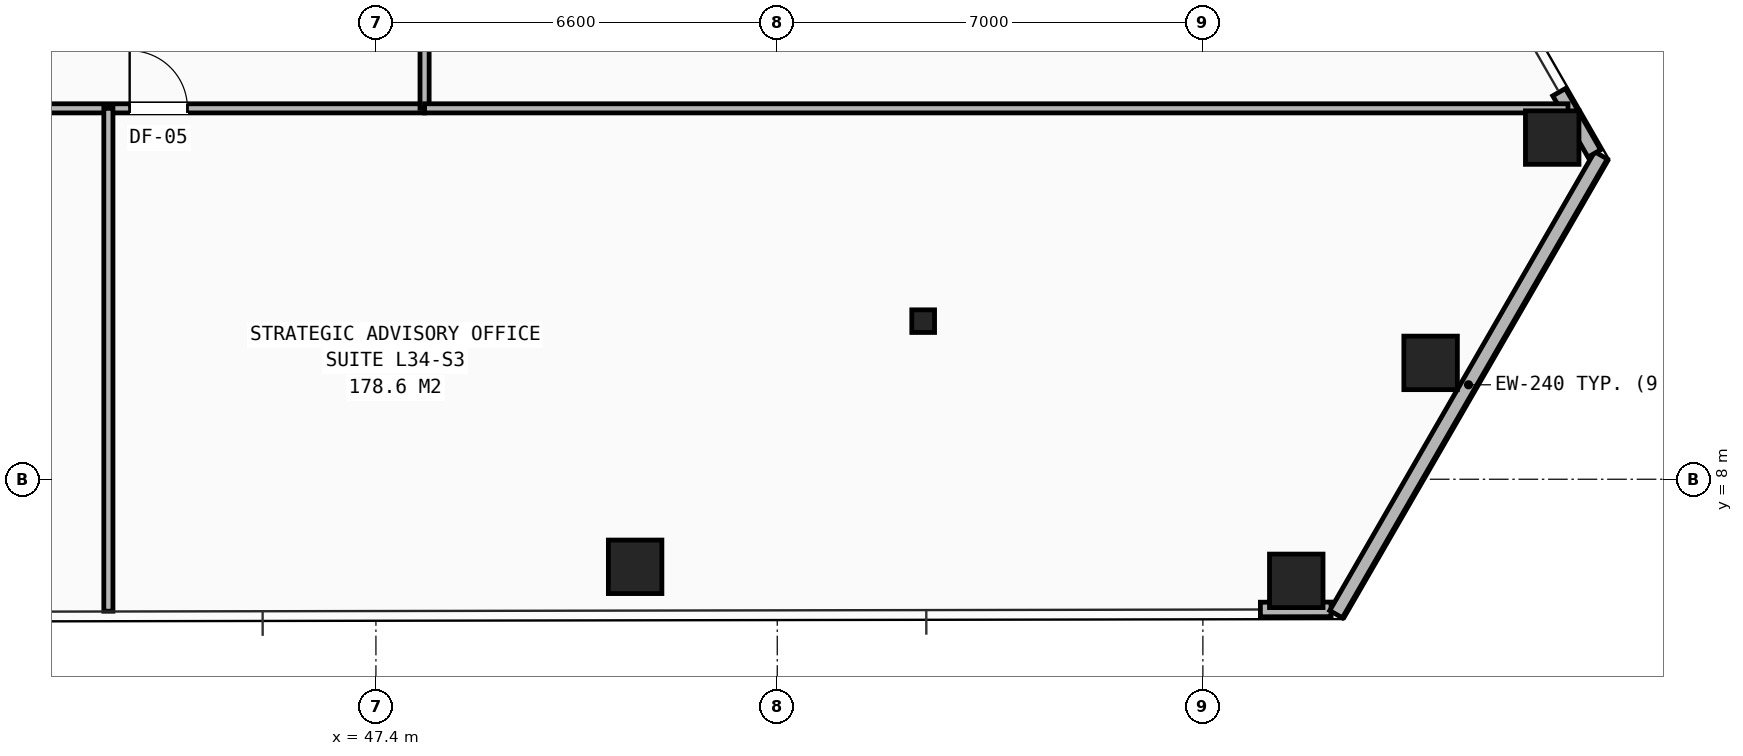
"""IFC4 building model, lengths in metres.
Left out: names, types, materials, properties, quantities, classifications, styles, units other than length and angle.
Written with IfcOpenShell. Run it as: python <this file> out.ifc"""

import sys

from ifc_helpers import new_model, si_unit, direction, frame, frame_2d, origin, origin_2d, place, context, subcontext, project, spatial, rectangle, hollow_rectangle, i_section, extrude, element, fill, save


model = new_model("IFC4")
c1 = context("Model", 3, precision=1e-05, world=origin(), true_north=direction((0.0, 1.0)))
c2 = subcontext(c1, "Body", "Model", "MODEL_VIEW")
j1 = project(units=[si_unit("LENGTHUNIT", "METRE"), si_unit("PLANEANGLEUNIT", "RADIAN")], contexts=[c1])
p1 = place(None, origin())
s1 = spatial("IfcSite", under=j1, at=p1, CompositionType="ELEMENT")
p2 = place(p1, origin())
s2 = spatial("IfcBuilding", under=s1, at=p2, CompositionType="ELEMENT")
p3 = place(p2, frame((0.0, 0.0, 119.45)))
s3 = spatial("IfcBuildingStorey", under=s2, at=p3, CompositionType="ELEMENT", Elevation=119.45)
p4 = place(p3, frame((56.4, 10.6, 0.0), z_axis=(0.0, 0.0, 1.0), x_axis=(1.0, 0.0, 0.0)))
e1 = element("IfcColumn", 1, at=p4, inside=s3, PredefinedType="COLUMN", context=c2, shape_type="SweptSolid", body=[
    extrude(i_section(OverallWidth=0.374, OverallDepth=0.372, WebThickness=0.016, FlangeThickness=0.026, at=origin_2d()), origin(), (0.0, 0.0, 1.0), 3.45),
])
for number, where, z_axis, x_axis in (
    (2, (51.663, 6.56, 0.0), (0.0, 0.0, 1.0), (1.0, 0.0, 0.0)),
    (3, (62.536, 6.329, 0.0), (0.0, 0.0, 1.0), (1.0, 0.0, 0.0)),
    (4, (64.745, 9.913, 0.0), (0.0, 0.0, 1.0), (1.0, 0.0, 0.0)),
    (5, (66.745, 13.619, 0.0), (0.0, 0.0, 1.0), (1.0, 0.0, 0.0)),
):
    element("IfcColumn", number, at=place(p3, frame(where, z_axis=z_axis, x_axis=x_axis)), inside=s3, PredefinedType="COLUMN", context=c2, shape_type="SweptSolid", body=[
        extrude(hollow_rectangle(XDim=0.88, YDim=0.88, WallThickness=0.06, at=origin_2d()), origin(), (0.0, 0.0, 1.0), 3.45),
    ])
p5 = place(p3, frame((61.946, 5.858, 0.0), z_axis=(0.0, 0.0, 1.0), x_axis=(0.999998588859, 0.00167996403, 0.0)))
e6 = element("IfcWall", 6, at=p5, inside=s3, PredefinedType="SHEAR", context=c2, shape_type="SweptSolid", body=[
    extrude(rectangle(XDim=1.163, YDim=0.24, at=frame_2d((0.581, 0.0))), origin(), (0.0, 0.0, 1.0), 2.583),
])
p6 = place(p3, frame((67.547, 13.327, 0.0), z_axis=(0.0, 0.0, 1.0), x_axis=(-0.499998917442, -0.866026028799, 0.0)))
e7 = element("IfcWall", 7, at=p6, inside=s3, PredefinedType="SHEAR", context=c2, shape_type="SweptSolid", body=[
    extrude(rectangle(XDim=8.714, YDim=0.24, at=frame_2d((4.357, 0.0))), origin(), (0.0, 0.0, 1.0), 2.583),
])
p7 = place(p3, frame((67.438, 13.358, 0.0), z_axis=(0.0, 0.0, 1.0), x_axis=(-0.498625017703, 0.866817796149, 0.0)))
e8 = element("IfcWall", 8, at=p7, inside=s3, PredefinedType="SHEAR", context=c2, shape_type="SweptSolid", body=[
    extrude(rectangle(XDim=1.162, YDim=0.24, at=frame_2d((0.581, 0.0))), origin(), (0.0, 0.0, 1.0), 2.583),
])
p8 = place(p3, frame((29.6, 14.1, 0.0), z_axis=(0.0, 0.0, 1.0), x_axis=(1.0, 0.0, 0.0)))
e9 = element("IfcWall", 9, at=p8, inside=s3, PredefinedType="PARTITIONING", context=c2, shape_type="SweptSolid", body=[
    extrude(rectangle(XDim=18.6, YDim=0.15, at=frame_2d((9.3, 0.0))), origin(), (0.0, 0.0, 1.0), 2.252),
])
p9 = place(p8, frame((0.55, 0.0, 0.0)))
e10 = element("IfcOpeningElement", 10, at=p9, cuts=e9, PredefinedType="OPENING", context=c2, shape_type="SweptSolid", body=[
    extrude(rectangle(XDim=0.95, YDim=2.1, at=frame_2d((0.475, 1.05))), frame((0.0, 0.085, 0.0), z_axis=(0.0, -1.0, 0.0), x_axis=(1.0, 0.0, 0.0)), (0.0, 0.0, 1.0), 0.17),
])
p10 = place(p8, frame((7.25, 0.0, 0.0)))
e11 = element("IfcOpeningElement", 11, at=p10, cuts=e9, PredefinedType="OPENING", context=c2, shape_type="SweptSolid", body=[
    extrude(rectangle(XDim=0.95, YDim=2.1, at=frame_2d((0.475, 1.05))), frame((0.0, 0.085, 0.0), z_axis=(0.0, -1.0, 0.0), x_axis=(1.0, 0.0, 0.0)), (0.0, 0.0, 1.0), 0.17),
])
p11 = place(p8, frame((13.75, 0.0, 0.0)))
e12 = element("IfcOpeningElement", 12, at=p11, cuts=e9, PredefinedType="OPENING", context=c2, shape_type="SweptSolid", body=[
    extrude(rectangle(XDim=0.95, YDim=2.1, at=frame_2d((0.475, 1.05))), frame((0.0, 0.085, 0.0), z_axis=(0.0, -1.0, 0.0), x_axis=(1.0, 0.0, 0.0)), (0.0, 0.0, 1.0), 0.17),
])
p12 = place(p3, frame((48.2, 14.1, 0.0), z_axis=(0.0, 0.0, 1.0), x_axis=(0.0, 1.0, 0.0)))
e13 = element("IfcWall", 13, at=p12, inside=s3, PredefinedType="PARTITIONING", context=c2, shape_type="SweptSolid", body=[
    extrude(rectangle(XDim=2.3, YDim=0.15, at=frame_2d((1.15, 0.0))), origin(), (0.0, 0.0, 1.0), 2.661),
])
p13 = place(p3, frame((43.0, 5.83, 0.0), z_axis=(0.0, 0.0, 1.0), x_axis=(0.0, 1.0, 0.0)))
e14 = element("IfcWall", 14, at=p13, inside=s3, PredefinedType="PARTITIONING", context=c2, shape_type="SweptSolid", body=[
    extrude(rectangle(XDim=8.271, YDim=0.15, at=frame_2d((4.135, 0.0))), origin(), (0.0, 0.0, 1.0), 2.589),
])
p14 = place(p3, frame((48.2, 14.1, 0.0), z_axis=(0.0, 0.0, 1.0), x_axis=(1.0, 0.0, 0.0)))
e15 = element("IfcWall", 15, at=p14, inside=s3, PredefinedType="PARTITIONING", context=c2, shape_type="SweptSolid", body=[
    extrude(rectangle(XDim=18.805, YDim=0.15, at=frame_2d((9.402, 0.0))), origin(), (0.0, 0.0, 1.0), 2.589),
])
p15 = place(p11, origin())
e16 = element("IfcDoor", 16, at=p15, inside=s3, OperationType="SINGLE_SWING_LEFT", PredefinedType="DOOR", context=c2, shape_type="SweptSolid", body=[
    extrude(rectangle(XDim=0.95, YDim=2.1, at=frame_2d((0.475, 1.05))), frame((0.0, 0.025, 0.0), z_axis=(0.0, -1.0, 0.0), x_axis=(1.0, 0.0, 0.0)), (0.0, 0.0, 1.0), 0.05),
])
fill(e12, e16)
save(model, sys.argv[1])
